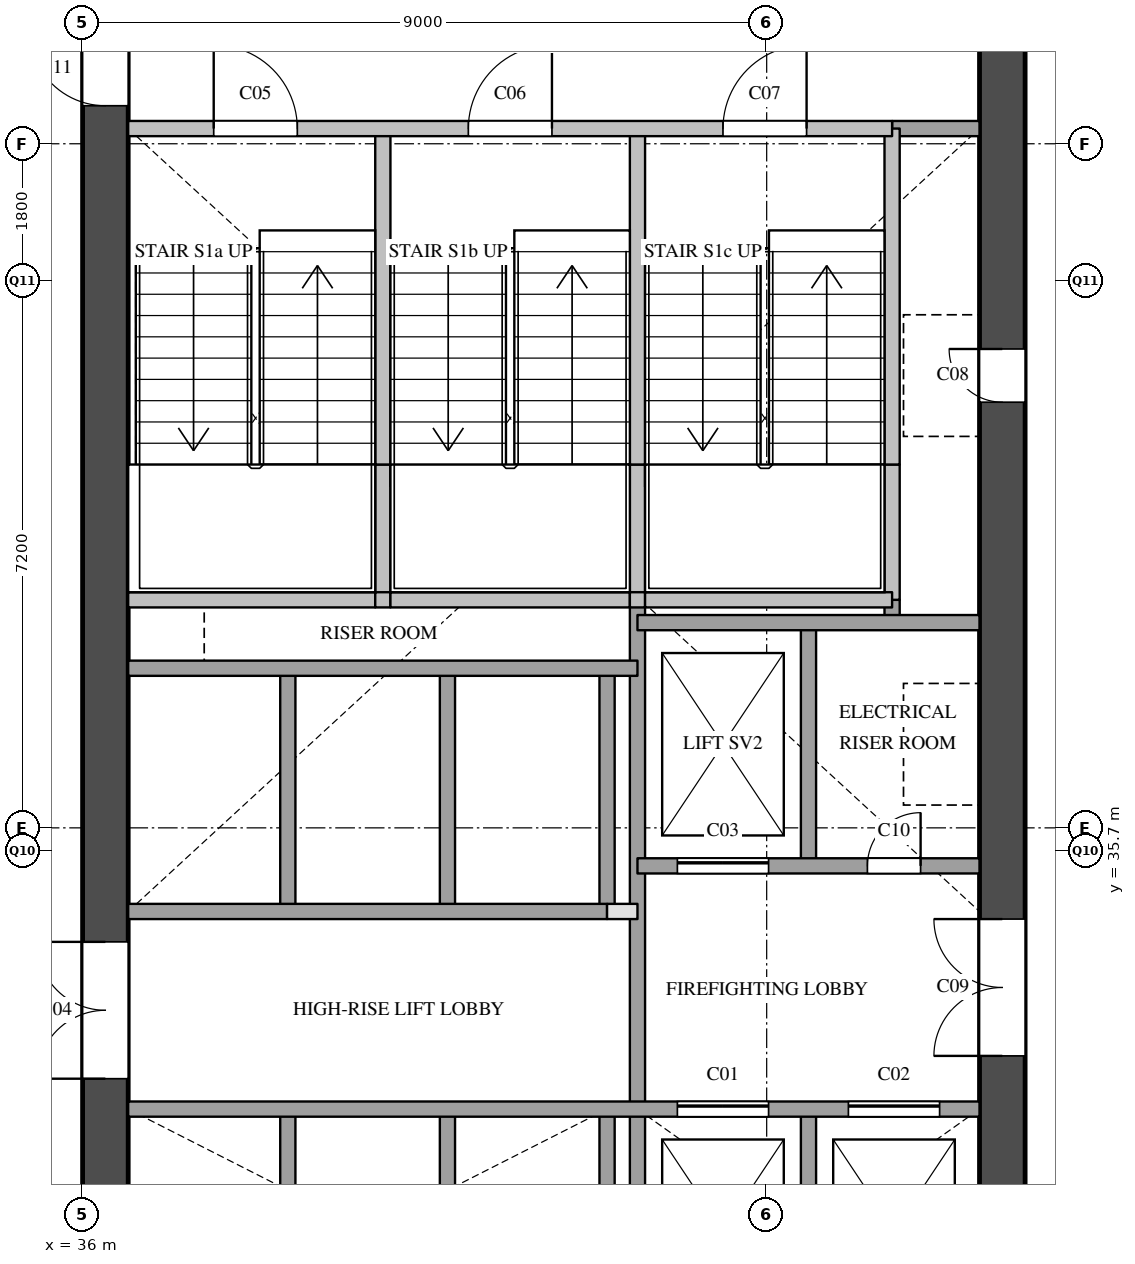
"""IFC4 building model, lengths in metres.
Left out: names, types, materials, properties, quantities, classifications, styles, units other than length and angle.
Written with IfcOpenShell. Run it as: python <this file> out.ifc"""

import sys

from ifc_helpers import new_model, si_unit, direction, frame, frame_2d, origin, place, context, subcontext, project, spatial, rectangle, extrude, element, fill, save


model = new_model("IFC4")
c1 = context("Model", 3, precision=1e-05, world=origin(), true_north=direction((0.0, 1.0)))
c2 = subcontext(c1, "Body", "Model", "MODEL_VIEW")
j1 = project(units=[si_unit("LENGTHUNIT", "METRE"), si_unit("PLANEANGLEUNIT", "RADIAN")], contexts=[c1])
p1 = place(None, origin())
s1 = spatial("IfcSite", under=j1, at=p1, CompositionType="ELEMENT")
p2 = place(p1, origin())
s2 = spatial("IfcBuilding", under=s1, at=p2, CompositionType="ELEMENT")
p3 = place(p2, frame((0.0, 0.0, 50.0)))
s3 = spatial("IfcBuildingStorey", under=s2, at=p3, CompositionType="ELEMENT", Elevation=50.0)
p4 = place(p3, frame((36.3, 29.1, 0.0), z_axis=(0.0, 0.0, 1.0), x_axis=(0.0, 1.0, 0.0)))
e1 = element("IfcWall", 1, at=p4, inside=s3, PredefinedType="SHEAR", context=c2, shape_type="SweptSolid", body=[
    extrude(rectangle(XDim=20.3, YDim=0.6, at=frame_2d((10.15, 0.0))), origin(), (0.0, 0.0, 1.0), 3.5),
])
p5 = place(p4, frame((3.6, 0.0, 0.0)))
e2 = element("IfcOpeningElement", 2, at=p5, cuts=e1, PredefinedType="OPENING", context=c2, shape_type="SweptSolid", body=[
    extrude(rectangle(XDim=1.8, YDim=2.1, at=frame_2d((0.9, 1.05))), frame((0.0, 0.31, 0.0), z_axis=(0.0, -1.0, 0.0), x_axis=(1.0, 0.0, 0.0)), (0.0, 0.0, 1.0), 0.62),
])
p6 = place(p4, frame((16.4, 0.0, 0.0)))
e3 = element("IfcOpeningElement", 3, at=p6, cuts=e1, PredefinedType="OPENING", context=c2, shape_type="SweptSolid", body=[
    extrude(rectangle(XDim=1.0, YDim=2.1, at=frame_2d((0.5, 1.05))), frame((0.0, 0.31, 0.0), z_axis=(0.0, -1.0, 0.0), x_axis=(1.0, 0.0, 0.0)), (0.0, 0.0, 1.0), 0.62),
])
p7 = place(p3, frame((48.1, 29.1, 0.0), z_axis=(0.0, 0.0, 1.0), x_axis=(0.0, 1.0, 0.0)))
e4 = element("IfcWall", 4, at=p7, inside=s3, PredefinedType="SHEAR", context=c2, shape_type="SweptSolid", body=[
    extrude(rectangle(XDim=20.3, YDim=0.6, at=frame_2d((10.15, 0.0))), origin(), (0.0, 0.0, 1.0), 3.5),
])
p8 = place(p7, frame((12.5, 0.0, 0.0)))
e5 = element("IfcOpeningElement", 5, at=p8, cuts=e4, PredefinedType="OPENING", context=c2, shape_type="SweptSolid", body=[
    extrude(rectangle(XDim=0.7, YDim=2.1, at=frame_2d((0.35, 1.05))), frame((0.0, 0.31, 0.0), z_axis=(0.0, -1.0, 0.0), x_axis=(1.0, 0.0, 0.0)), (0.0, 0.0, 1.0), 0.62),
])
p9 = place(p7, frame((3.9, 0.0, 0.0)))
e6 = element("IfcOpeningElement", 6, at=p9, cuts=e4, PredefinedType="OPENING", context=c2, shape_type="SweptSolid", body=[
    extrude(rectangle(XDim=1.8, YDim=2.1, at=frame_2d((0.9, 1.05))), frame((0.0, 0.31, 0.0), z_axis=(0.0, -1.0, 0.0), x_axis=(1.0, 0.0, 0.0)), (0.0, 0.0, 1.0), 0.62),
])
p10 = place(p3, frame((38.7, 29.1, 0.0), z_axis=(0.0, 0.0, 1.0), x_axis=(0.0, 1.0, 0.0)))
e7 = element("IfcWall", 7, at=p10, inside=s3, PredefinedType="SOLIDWALL", context=c2, shape_type="SweptSolid", body=[
    extrude(rectangle(XDim=3.2, YDim=0.2, at=frame_2d((1.6, 0.0))), origin(), (0.0, 0.0, 1.0), 3.5),
])
p11 = place(p3, frame((38.7, 34.9, 0.0), z_axis=(0.0, 0.0, 1.0), x_axis=(0.0, 1.0, 0.0)))
e8 = element("IfcWall", 8, at=p11, inside=s3, PredefinedType="SOLIDWALL", context=c2, shape_type="SweptSolid", body=[
    extrude(rectangle(XDim=3.2, YDim=0.2, at=frame_2d((1.6, 0.0))), origin(), (0.0, 0.0, 1.0), 3.5),
])
p12 = place(p3, frame((39.95, 39.0, 0.0), z_axis=(0.0, 0.0, 1.0), x_axis=(0.0, 1.0, 0.0)))
e9 = element("IfcWall", 9, at=p12, inside=s3, PredefinedType="SOLIDWALL", context=c2, shape_type="SweptSolid", body=[
    extrude(rectangle(XDim=1.78, YDim=0.2, at=frame_2d((0.89, 0.0))), origin(), (0.0, 0.0, 1.0), 3.5),
])
p13 = place(p3, frame((39.95, 40.78, 0.0), z_axis=(0.0, 0.0, 1.0), x_axis=(0.0, 1.0, 0.0)))
e10 = element("IfcWall", 10, at=p13, inside=s3, PredefinedType="SOLIDWALL", context=c2, shape_type="SweptSolid", body=[
    extrude(rectangle(XDim=4.42, YDim=0.2, at=frame_2d((2.21, 0.0))), origin(), (0.0, 0.0, 1.0), 3.5),
])
p14 = place(p3, frame((40.8, 29.1, 0.0), z_axis=(0.0, 0.0, 1.0), x_axis=(0.0, 1.0, 0.0)))
e11 = element("IfcWall", 11, at=p14, inside=s3, PredefinedType="SOLIDWALL", context=c2, shape_type="SweptSolid", body=[
    extrude(rectangle(XDim=3.2, YDim=0.2, at=frame_2d((1.6, 0.0))), origin(), (0.0, 0.0, 1.0), 3.5),
])
p15 = place(p3, frame((40.8, 34.9, 0.0), z_axis=(0.0, 0.0, 1.0), x_axis=(0.0, 1.0, 0.0)))
e12 = element("IfcWall", 12, at=p15, inside=s3, PredefinedType="SOLIDWALL", context=c2, shape_type="SweptSolid", body=[
    extrude(rectangle(XDim=3.2, YDim=0.2, at=frame_2d((1.6, 0.0))), origin(), (0.0, 0.0, 1.0), 3.5),
])
p16 = place(p3, frame((42.9, 29.1, 0.0), z_axis=(0.0, 0.0, 1.0), x_axis=(0.0, 1.0, 0.0)))
e13 = element("IfcWall", 13, at=p16, inside=s3, PredefinedType="SOLIDWALL", context=c2, shape_type="SweptSolid", body=[
    extrude(rectangle(XDim=3.2, YDim=0.2, at=frame_2d((1.6, 0.0))), origin(), (0.0, 0.0, 1.0), 3.5),
])
p17 = place(p3, frame((42.9, 34.9, 0.0), z_axis=(0.0, 0.0, 1.0), x_axis=(0.0, 1.0, 0.0)))
e14 = element("IfcWall", 14, at=p17, inside=s3, PredefinedType="SOLIDWALL", context=c2, shape_type="SweptSolid", body=[
    extrude(rectangle(XDim=3.2, YDim=0.2, at=frame_2d((1.6, 0.0))), origin(), (0.0, 0.0, 1.0), 3.5),
])
p18 = place(p3, frame((43.3, 29.1, 0.0), z_axis=(0.0, 0.0, 1.0), x_axis=(0.0, 1.0, 0.0)))
e15 = element("IfcWall", 15, at=p18, inside=s3, PredefinedType="SOLIDWALL", context=c2, shape_type="SweptSolid", body=[
    extrude(rectangle(XDim=9.9, YDim=0.2, at=frame_2d((4.95, 0.0))), origin(), (0.0, 0.0, 1.0), 3.5),
])
p19 = place(p3, frame((43.3, 39.0, 0.0), z_axis=(0.0, 0.0, 1.0), x_axis=(0.0, 1.0, 0.0)))
e16 = element("IfcWall", 16, at=p19, inside=s3, PredefinedType="SOLIDWALL", context=c2, shape_type="SweptSolid", body=[
    extrude(rectangle(XDim=1.78, YDim=0.2, at=frame_2d((0.89, 0.0))), origin(), (0.0, 0.0, 1.0), 3.5),
])
p20 = place(p3, frame((43.3, 40.78, 0.0), z_axis=(0.0, 0.0, 1.0), x_axis=(0.0, 1.0, 0.0)))
e17 = element("IfcWall", 17, at=p20, inside=s3, PredefinedType="SOLIDWALL", context=c2, shape_type="SweptSolid", body=[
    extrude(rectangle(XDim=4.42, YDim=0.2, at=frame_2d((2.21, 0.0))), origin(), (0.0, 0.0, 1.0), 3.5),
])
for number, where, z_axis, x_axis in (
    (18, (45.55, 29.1, 0.0), (0.0, 0.0, 1.0), (0.0, 1.0, 0.0)),
    (19, (45.55, 35.5, 0.0), (0.0, 0.0, 1.0), (0.0, 1.0, 0.0)),
):
    element("IfcWall", number, at=place(p3, frame(where, z_axis=z_axis, x_axis=x_axis)), inside=s3, PredefinedType="SOLIDWALL", context=c2, shape_type="SweptSolid", body=[
        extrude(rectangle(XDim=3.2, YDim=0.2, at=frame_2d((1.6, 0.0))), origin(), (0.0, 0.0, 1.0), 3.5),
    ])
p21 = place(p3, frame((46.65, 38.7, 0.0), z_axis=(0.0, 0.0, 1.0), x_axis=(0.0, 1.0, 0.0)))
e20 = element("IfcWall", 20, at=p21, inside=s3, PredefinedType="SOLIDWALL", context=c2, shape_type="SweptSolid", body=[
    extrude(rectangle(XDim=0.3, YDim=0.2, at=frame_2d((0.15, 0.0))), origin(), (0.0, 0.0, 1.0), 3.5),
])
p22 = place(p3, frame((46.65, 39.0, 0.0), z_axis=(0.0, 0.0, 1.0), x_axis=(0.0, 1.0, 0.0)))
e21 = element("IfcWall", 21, at=p22, inside=s3, PredefinedType="SOLIDWALL", context=c2, shape_type="SweptSolid", body=[
    extrude(rectangle(XDim=1.78, YDim=0.2, at=frame_2d((0.89, 0.0))), origin(), (0.0, 0.0, 1.0), 3.5),
])
p23 = place(p3, frame((46.65, 40.78, 0.0), z_axis=(0.0, 0.0, 1.0), x_axis=(0.0, 1.0, 0.0)))
e22 = element("IfcWall", 22, at=p23, inside=s3, PredefinedType="SOLIDWALL", context=c2, shape_type="SweptSolid", body=[
    extrude(rectangle(XDim=4.42, YDim=0.2, at=frame_2d((2.21, 0.0))), origin(), (0.0, 0.0, 1.0), 3.5),
])
p24 = place(p3, frame((36.6, 32.3, 0.0), z_axis=(0.0, 0.0, 1.0), x_axis=(1.0, 0.0, 0.0)))
e23 = element("IfcWall", 23, at=p24, inside=s3, PredefinedType="SOLIDWALL", context=c2, shape_type="SweptSolid", body=[
    extrude(rectangle(XDim=11.2, YDim=0.2, at=frame_2d((5.6, 0.0))), origin(), (0.0, 0.0, 1.0), 3.5),
])
p25 = place(p24, frame((7.225, 0.0, 0.0)))
e24 = element("IfcOpeningElement", 24, at=p25, cuts=e23, PredefinedType="OPENING", context=c2, shape_type="SweptSolid", body=[
    extrude(rectangle(XDim=1.2, YDim=2.1, at=frame_2d((0.6, 1.05))), frame((0.0, 0.11, 0.0), z_axis=(0.0, -1.0, 0.0), x_axis=(1.0, 0.0, 0.0)), (0.0, 0.0, 1.0), 0.22),
])
p26 = place(p24, frame((9.475, 0.0, 0.0)))
e25 = element("IfcOpeningElement", 25, at=p26, cuts=e23, PredefinedType="OPENING", context=c2, shape_type="SweptSolid", body=[
    extrude(rectangle(XDim=1.2, YDim=2.1, at=frame_2d((0.6, 1.05))), frame((0.0, 0.11, 0.0), z_axis=(0.0, -1.0, 0.0), x_axis=(1.0, 0.0, 0.0)), (0.0, 0.0, 1.0), 0.22),
])
p27 = place(p3, frame((42.9, 34.9, 0.0), z_axis=(0.0, 0.0, 1.0), x_axis=(1.0, 0.0, 0.0)))
e26 = element("IfcWall", 26, at=p27, inside=s3, PredefinedType="PARTITIONING", context=c2, shape_type="SweptSolid", body=[
    extrude(rectangle(XDim=0.4, YDim=0.2, at=frame_2d((0.2, 0.0))), origin(), (0.0, 0.0, 1.0), 3.5),
])
p28 = place(p3, frame((36.6, 34.9, 0.0), z_axis=(0.0, 0.0, 1.0), x_axis=(1.0, 0.0, 0.0)))
e27 = element("IfcWall", 27, at=p28, inside=s3, PredefinedType="SOLIDWALL", context=c2, shape_type="SweptSolid", body=[
    extrude(rectangle(XDim=6.3, YDim=0.2, at=frame_2d((3.15, 0.0))), origin(), (0.0, 0.0, 1.0), 3.5),
])
p29 = place(p3, frame((43.3, 35.5, 0.0), z_axis=(0.0, 0.0, 1.0), x_axis=(1.0, 0.0, 0.0)))
e28 = element("IfcWall", 28, at=p29, inside=s3, PredefinedType="SOLIDWALL", context=c2, shape_type="SweptSolid", body=[
    extrude(rectangle(XDim=4.5, YDim=0.2, at=frame_2d((2.25, 0.0))), origin(), (0.0, 0.0, 1.0), 3.5),
])
p30 = place(p29, frame((0.525, 0.0, 0.0)))
e29 = element("IfcOpeningElement", 29, at=p30, cuts=e28, PredefinedType="OPENING", context=c2, shape_type="SweptSolid", body=[
    extrude(rectangle(XDim=1.2, YDim=2.1, at=frame_2d((0.6, 1.05))), frame((0.0, 0.11, 0.0), z_axis=(0.0, -1.0, 0.0), x_axis=(1.0, 0.0, 0.0)), (0.0, 0.0, 1.0), 0.22),
])
p31 = place(p29, frame((3.025, 0.0, 0.0)))
e30 = element("IfcOpeningElement", 30, at=p31, cuts=e28, PredefinedType="OPENING", context=c2, shape_type="SweptSolid", body=[
    extrude(rectangle(XDim=0.7, YDim=2.1, at=frame_2d((0.35, 1.05))), frame((0.0, 0.11, 0.0), z_axis=(0.0, -1.0, 0.0), x_axis=(1.0, 0.0, 0.0)), (0.0, 0.0, 1.0), 0.22),
])
p32 = place(p3, frame((36.6, 38.1, 0.0), z_axis=(0.0, 0.0, 1.0), x_axis=(1.0, 0.0, 0.0)))
e31 = element("IfcWall", 31, at=p32, inside=s3, PredefinedType="SOLIDWALL", context=c2, shape_type="SweptSolid", body=[
    extrude(rectangle(XDim=6.7, YDim=0.2, at=frame_2d((3.35, 0.0))), origin(), (0.0, 0.0, 1.0), 3.5),
])
p33 = place(p3, frame((43.3, 38.7, 0.0), z_axis=(0.0, 0.0, 1.0), x_axis=(1.0, 0.0, 0.0)))
e32 = element("IfcWall", 32, at=p33, inside=s3, PredefinedType="SOLIDWALL", context=c2, shape_type="SweptSolid", body=[
    extrude(rectangle(XDim=4.5, YDim=0.2, at=frame_2d((2.25, 0.0))), origin(), (0.0, 0.0, 1.0), 3.5),
])
p34 = place(p3, frame((36.6, 39.0, 0.0), z_axis=(0.0, 0.0, 1.0), x_axis=(1.0, 0.0, 0.0)))
e33 = element("IfcWall", 33, at=p34, inside=s3, PredefinedType="SOLIDWALL", context=c2, shape_type="SweptSolid", body=[
    extrude(rectangle(XDim=3.25, YDim=0.2, at=frame_2d((1.625, 0.0))), origin(), (0.0, 0.0, 1.0), 3.5),
])
p35 = place(p3, frame((39.85, 39.0, 0.0), z_axis=(0.0, 0.0, 1.0), x_axis=(1.0, 0.0, 0.0)))
e34 = element("IfcWall", 34, at=p35, inside=s3, PredefinedType="SOLIDWALL", context=c2, shape_type="SweptSolid", body=[
    extrude(rectangle(XDim=0.2, YDim=0.2, at=frame_2d((0.1, 0.0))), origin(), (0.0, 0.0, 1.0), 3.5),
])
p36 = place(p3, frame((40.05, 39.0, 0.0), z_axis=(0.0, 0.0, 1.0), x_axis=(1.0, 0.0, 0.0)))
e35 = element("IfcWall", 35, at=p36, inside=s3, PredefinedType="SOLIDWALL", context=c2, shape_type="SweptSolid", body=[
    extrude(rectangle(XDim=3.15, YDim=0.2, at=frame_2d((1.575, 0.0))), origin(), (0.0, 0.0, 1.0), 3.5),
])
p37 = place(p3, frame((43.2, 39.0, 0.0), z_axis=(0.0, 0.0, 1.0), x_axis=(1.0, 0.0, 0.0)))
e36 = element("IfcWall", 36, at=p37, inside=s3, PredefinedType="SOLIDWALL", context=c2, shape_type="SweptSolid", body=[
    extrude(rectangle(XDim=0.2, YDim=0.2, at=frame_2d((0.1, 0.0))), origin(), (0.0, 0.0, 1.0), 3.5),
])
p38 = place(p3, frame((43.4, 39.0, 0.0), z_axis=(0.0, 0.0, 1.0), x_axis=(1.0, 0.0, 0.0)))
e37 = element("IfcWall", 37, at=p38, inside=s3, PredefinedType="SOLIDWALL", context=c2, shape_type="SweptSolid", body=[
    extrude(rectangle(XDim=3.25, YDim=0.2, at=frame_2d((1.625, 0.0))), origin(), (0.0, 0.0, 1.0), 3.5),
])
p39 = place(p3, frame((46.65, 45.2, 0.0), z_axis=(0.0, 0.0, 1.0), x_axis=(1.0, 0.0, 0.0)))
e38 = element("IfcWall", 38, at=p39, inside=s3, PredefinedType="SOLIDWALL", context=c2, shape_type="SweptSolid", body=[
    extrude(rectangle(XDim=1.15, YDim=0.2, at=frame_2d((0.575, 0.0))), origin(), (0.0, 0.0, 1.0), 3.5),
])
p40 = place(p3, frame((36.6, 45.2, 0.0), z_axis=(0.0, 0.0, 1.0), x_axis=(1.0, 0.0, 0.0)))
e39 = element("IfcWall", 39, at=p40, inside=s3, PredefinedType="SOLIDWALL", context=c2, shape_type="SweptSolid", body=[
    extrude(rectangle(XDim=10.05, YDim=0.2, at=frame_2d((5.025, 0.0))), origin(), (0.0, 0.0, 1.0), 3.5),
])
p41 = place(p40, frame((1.125, 0.0, 0.0)))
e40 = element("IfcOpeningElement", 40, at=p41, cuts=e39, PredefinedType="OPENING", context=c2, shape_type="SweptSolid", body=[
    extrude(rectangle(XDim=1.1, YDim=2.1, at=frame_2d((0.55, 1.05))), frame((0.0, 0.11, 0.0), z_axis=(0.0, -1.0, 0.0), x_axis=(1.0, 0.0, 0.0)), (0.0, 0.0, 1.0), 0.22),
])
p42 = place(p40, frame((4.475, 0.0, 0.0)))
e41 = element("IfcOpeningElement", 41, at=p42, cuts=e39, PredefinedType="OPENING", context=c2, shape_type="SweptSolid", body=[
    extrude(rectangle(XDim=1.1, YDim=2.1, at=frame_2d((0.55, 1.05))), frame((0.0, 0.11, 0.0), z_axis=(0.0, -1.0, 0.0), x_axis=(1.0, 0.0, 0.0)), (0.0, 0.0, 1.0), 0.22),
])
p43 = place(p40, frame((7.825, 0.0, 0.0)))
e42 = element("IfcOpeningElement", 42, at=p43, cuts=e39, PredefinedType="OPENING", context=c2, shape_type="SweptSolid", body=[
    extrude(rectangle(XDim=1.1, YDim=2.1, at=frame_2d((0.55, 1.05))), frame((0.0, 0.11, 0.0), z_axis=(0.0, -1.0, 0.0), x_axis=(1.0, 0.0, 0.0)), (0.0, 0.0, 1.0), 0.22),
])
p44 = place(p25, origin())
e43 = element("IfcDoor", 43, at=p44, inside=s3, OperationType="SLIDING_TO_LEFT", PredefinedType="DOOR", context=c2, shape_type="SweptSolid", body=[
    extrude(rectangle(XDim=1.2, YDim=2.1, at=frame_2d((0.6, 1.05))), frame((0.0, 0.025, 0.0), z_axis=(0.0, -1.0, 0.0), x_axis=(1.0, 0.0, 0.0)), (0.0, 0.0, 1.0), 0.05),
])
fill(e24, e43)
p45 = place(p26, origin())
e44 = element("IfcDoor", 44, at=p45, inside=s3, OperationType="SLIDING_TO_LEFT", PredefinedType="DOOR", context=c2, shape_type="SweptSolid", body=[
    extrude(rectangle(XDim=1.2, YDim=2.1, at=frame_2d((0.6, 1.05))), frame((0.0, 0.025, 0.0), z_axis=(0.0, -1.0, 0.0), x_axis=(1.0, 0.0, 0.0)), (0.0, 0.0, 1.0), 0.05),
])
fill(e25, e44)
p46 = place(p30, origin())
e45 = element("IfcDoor", 45, at=p46, inside=s3, OperationType="SLIDING_TO_LEFT", PredefinedType="DOOR", context=c2, shape_type="SweptSolid", body=[
    extrude(rectangle(XDim=1.2, YDim=2.1, at=frame_2d((0.6, 1.05))), frame((0.0, 0.025, 0.0), z_axis=(0.0, -1.0, 0.0), x_axis=(1.0, 0.0, 0.0)), (0.0, 0.0, 1.0), 0.05),
])
fill(e29, e45)
p47 = place(p5, origin())
e46 = element("IfcDoor", 46, at=p47, inside=s3, OperationType="DOUBLE_DOOR_SINGLE_SWING", PredefinedType="DOOR", context=c2, shape_type="SweptSolid", body=[
    extrude(rectangle(XDim=1.8, YDim=2.1, at=frame_2d((0.9, 1.05))), frame((0.0, 0.025, 0.0), z_axis=(0.0, -1.0, 0.0), x_axis=(1.0, 0.0, 0.0)), (0.0, 0.0, 1.0), 0.05),
])
fill(e2, e46)
p48 = place(p41, origin())
e47 = element("IfcDoor", 47, at=p48, inside=s3, OperationType="SINGLE_SWING_LEFT", PredefinedType="DOOR", context=c2, shape_type="SweptSolid", body=[
    extrude(rectangle(XDim=1.1, YDim=2.1, at=frame_2d((0.55, 1.05))), frame((0.0, 0.025, 0.0), z_axis=(0.0, -1.0, 0.0), x_axis=(1.0, 0.0, 0.0)), (0.0, 0.0, 1.0), 0.05),
])
fill(e40, e47)
p49 = place(p42, origin())
e48 = element("IfcDoor", 48, at=p49, inside=s3, OperationType="SINGLE_SWING_RIGHT", PredefinedType="DOOR", context=c2, shape_type="SweptSolid", body=[
    extrude(rectangle(XDim=1.1, YDim=2.1, at=frame_2d((0.55, 1.05))), frame((0.0, 0.025, 0.0), z_axis=(0.0, -1.0, 0.0), x_axis=(1.0, 0.0, 0.0)), (0.0, 0.0, 1.0), 0.05),
])
fill(e41, e48)
p50 = place(p43, origin())
e49 = element("IfcDoor", 49, at=p50, inside=s3, OperationType="SINGLE_SWING_RIGHT", PredefinedType="DOOR", context=c2, shape_type="SweptSolid", body=[
    extrude(rectangle(XDim=1.1, YDim=2.1, at=frame_2d((0.55, 1.05))), frame((0.0, 0.025, 0.0), z_axis=(0.0, -1.0, 0.0), x_axis=(1.0, 0.0, 0.0)), (0.0, 0.0, 1.0), 0.05),
])
fill(e42, e49)
p51 = place(p8, origin())
e50 = element("IfcDoor", 50, at=p51, inside=s3, OperationType="SINGLE_SWING_RIGHT", PredefinedType="DOOR", context=c2, shape_type="SweptSolid", body=[
    extrude(rectangle(XDim=0.7, YDim=2.1, at=frame_2d((0.35, 1.05))), frame((0.0, 0.025, 0.0), z_axis=(0.0, -1.0, 0.0), x_axis=(1.0, 0.0, 0.0)), (0.0, 0.0, 1.0), 0.05),
])
fill(e5, e50)
p52 = place(p9, origin())
e51 = element("IfcDoor", 51, at=p52, inside=s3, OperationType="DOUBLE_DOOR_SINGLE_SWING", PredefinedType="DOOR", context=c2, shape_type="SweptSolid", body=[
    extrude(rectangle(XDim=1.8, YDim=2.1, at=frame_2d((0.9, 1.05))), frame((0.0, 0.025, 0.0), z_axis=(0.0, -1.0, 0.0), x_axis=(1.0, 0.0, 0.0)), (0.0, 0.0, 1.0), 0.05),
])
fill(e6, e51)
p53 = place(p31, origin())
e52 = element("IfcDoor", 52, at=p53, inside=s3, OperationType="SINGLE_SWING_RIGHT", PredefinedType="DOOR", context=c2, shape_type="SweptSolid", body=[
    extrude(rectangle(XDim=0.7, YDim=2.1, at=frame_2d((0.35, 1.05))), frame((0.0, 0.025, 0.0), z_axis=(0.0, -1.0, 0.0), x_axis=(1.0, 0.0, 0.0)), (0.0, 0.0, 1.0), 0.05),
])
fill(e30, e52)
p54 = place(p6, origin())
e53 = element("IfcDoor", 53, at=p54, inside=s3, OperationType="SINGLE_SWING_RIGHT", PredefinedType="DOOR", context=c2, shape_type="SweptSolid", body=[
    extrude(rectangle(XDim=1.0, YDim=2.1, at=frame_2d((0.5, 1.05))), frame((0.0, 0.025, 0.0), z_axis=(0.0, -1.0, 0.0), x_axis=(1.0, 0.0, 0.0)), (0.0, 0.0, 1.0), 0.05),
])
fill(e3, e53)
save(model, sys.argv[1])
